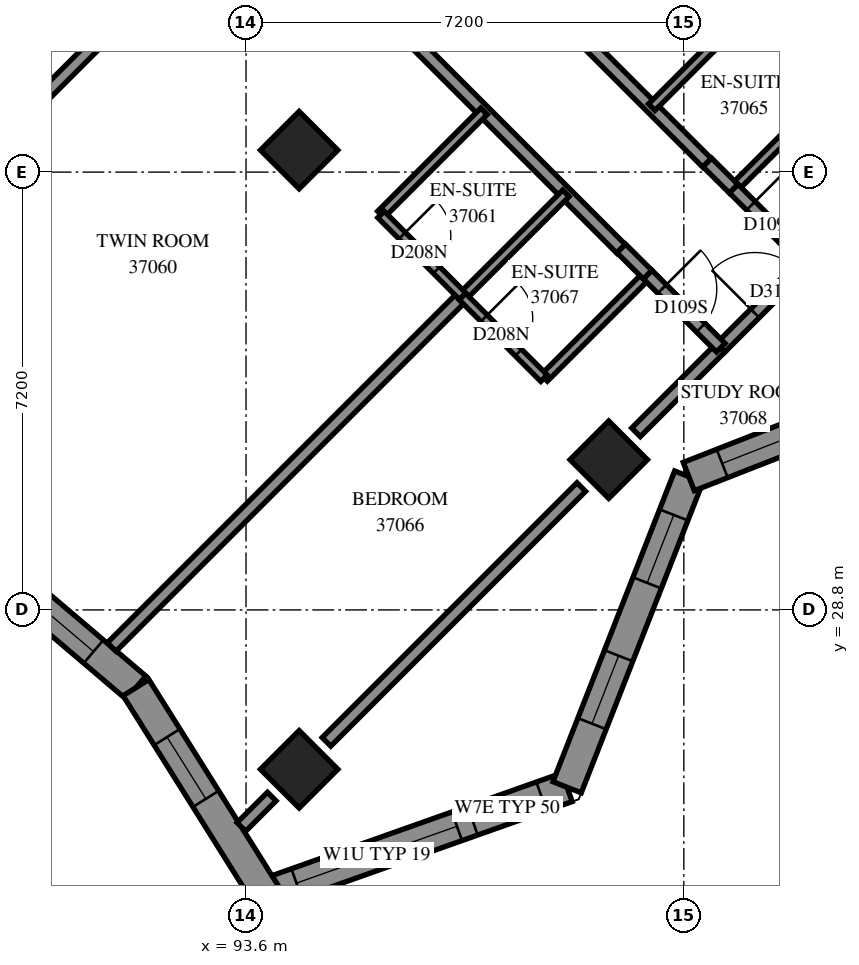
"""IFC4 building model, lengths in metres.
Left out: names, types, materials, properties, quantities, classifications, styles, units other than length and angle.
Written with IfcOpenShell. Run it as: python <this file> out.ifc"""

import sys

from ifc_helpers import new_model, si_unit, direction, frame, frame_2d, origin, origin_2d, place, context, subcontext, project, spatial, polyline, rectangle, outline, extrude, element, fill, save


model = new_model("IFC4")
c1 = context("Model", 3, precision=1e-05, world=origin(), true_north=direction((0.0, 1.0)))
c2 = subcontext(c1, "Body", "Model", "MODEL_VIEW")
j1 = project(units=[si_unit("LENGTHUNIT", "METRE"), si_unit("PLANEANGLEUNIT", "RADIAN")], contexts=[c1])
p1 = place(None, origin())
s1 = spatial("IfcSite", under=j1, at=p1, CompositionType="ELEMENT")
p2 = place(p1, origin())
s2 = spatial("IfcBuilding", under=s1, at=p2, CompositionType="ELEMENT")
p3 = place(p2, frame((0.0, 0.0, 138.8)))
s3 = spatial("IfcBuildingStorey", under=s2, at=p3, CompositionType="ELEMENT", Elevation=138.8)
for number, where, z_axis, x_axis in (
    (1, (94.474, 36.362, 0.0), (0.0, 0.0, 1.0), (0.707, -0.707, 0.0)),
    (2, (99.565, 31.271, 0.0), (0.0, 0.0, 1.0), (0.707, -0.707, 0.0)),
    (3, (94.474, 26.18, 0.0), (0.0, 0.0, 1.0), (0.707, -0.707, 0.0)),
):
    element("IfcColumn", number, at=place(p3, frame(where, z_axis=z_axis, x_axis=x_axis)), inside=s3, PredefinedType="COLUMN", context=c2, shape_type="SweptSolid", body=[
        extrude(rectangle(XDim=0.9, YDim=0.9, at=origin_2d()), origin(), (0.0, 0.0, 1.0), 3.1),
    ])
p4 = place(p3, frame((93.921, 24.127, 0.0), z_axis=(0.0, 0.0, 1.0), x_axis=(0.9426181277, 0.333872828, 0.0)))
e4 = element("IfcWall", 4, at=p4, inside=s3, PredefinedType="SOLIDWALL", context=c2, shape_type="SweptSolid", body=[
    extrude(outline(polyline([(-0.2, -0.25), (5.375, -0.25), (5.147, 0.25), (0.2, 0.25), (-0.2, -0.25)])), origin(), (0.0, 0.0, 1.0), 3.1),
])
p5 = place(p4, frame((0.539, 0.0, 0.45)))
e5 = element("IfcOpeningElement", 5, at=p5, cuts=e4, PredefinedType="OPENING", context=c2, shape_type="SweptSolid", body=[
    extrude(rectangle(XDim=2.8, YDim=2.5, at=frame_2d((1.4, 1.25))), frame((0.0, 0.26, 0.0), z_axis=(0.0, -1.0, 0.0), x_axis=(1.0, 0.0, 0.0)), (0.0, 0.0, 1.0), 0.52),
])
p6 = place(p4, frame((3.613, 0.0, 0.45)))
e6 = element("IfcOpeningElement", 6, at=p6, cuts=e4, PredefinedType="OPENING", context=c2, shape_type="SweptSolid", body=[
    extrude(rectangle(XDim=1.2, YDim=2.5, at=frame_2d((0.6, 1.25))), frame((0.0, 0.26, 0.0), z_axis=(0.0, -1.0, 0.0), x_axis=(1.0, 0.0, 0.0)), (0.0, 0.0, 1.0), 0.52),
])
p7 = place(p3, frame((98.88, 25.884, 0.0), z_axis=(0.0, 0.0, 1.0), x_axis=(0.3646666187, 0.9311381515, 0.0)))
e7 = element("IfcWall", 7, at=p7, inside=s3, PredefinedType="SOLIDWALL", context=c2, shape_type="SweptSolid", body=[
    extrude(outline(polyline([(-0.114, -0.25), (5.378, -0.25), (5.597, 0.25), (0.114, 0.25), (-0.114, -0.25)])), origin(), (0.0, 0.0, 1.0), 3.1),
])
p8 = place(p7, frame((1.123, 0.0, 0.45)))
e8 = element("IfcOpeningElement", 8, at=p8, cuts=e7, PredefinedType="OPENING", context=c2, shape_type="SweptSolid", body=[
    extrude(rectangle(XDim=1.2, YDim=2.5, at=frame_2d((0.6, 1.25))), frame((0.0, 0.26, 0.0), z_axis=(0.0, -1.0, 0.0), x_axis=(1.0, 0.0, 0.0)), (0.0, 0.0, 1.0), 0.52),
])
p9 = place(p7, frame((3.61, 0.0, 0.45)))
e9 = element("IfcOpeningElement", 9, at=p9, cuts=e7, PredefinedType="OPENING", context=c2, shape_type="SweptSolid", body=[
    extrude(rectangle(XDim=1.2, YDim=2.5, at=frame_2d((0.6, 1.25))), frame((0.0, 0.26, 0.0), z_axis=(0.0, -1.0, 0.0), x_axis=(1.0, 0.0, 0.0)), (0.0, 0.0, 1.0), 0.52),
])
p10 = place(p3, frame((100.881, 30.993, 0.0), z_axis=(0.0, 0.0, 1.0), x_axis=(0.9311443392, 0.3646508186, 0.0)))
e10 = element("IfcWall", 10, at=p10, inside=s3, PredefinedType="SOLIDWALL", context=c2, shape_type="SweptSolid", body=[
    extrude(outline(polyline([(0.109, -0.25), (5.602, -0.25), (5.373, 0.25), (-0.109, 0.25), (0.109, -0.25)])), origin(), (0.0, 0.0, 1.0), 3.1),
])
p11 = place(p10, frame((0.589, 0.0, 0.45)))
e11 = element("IfcOpeningElement", 11, at=p11, cuts=e10, PredefinedType="OPENING", context=c2, shape_type="SweptSolid", body=[
    extrude(rectangle(XDim=2.8, YDim=2.5, at=frame_2d((1.4, 1.25))), frame((0.0, 0.26, 0.0), z_axis=(0.0, -1.0, 0.0), x_axis=(1.0, 0.0, 0.0)), (0.0, 0.0, 1.0), 0.52),
])
p12 = place(p3, frame((88.669, 30.175, 0.0), z_axis=(0.0, 0.0, 1.0), x_axis=(0.76200858, -0.6475669262, 0.0)))
e12 = element("IfcWall", 12, at=p12, inside=s3, PredefinedType="SOLIDWALL", context=c2, shape_type="SweptSolid", body=[
    extrude(outline(polyline([(-0.02, -0.25), (4.058, -0.25), (4.135, 0.25), (0.02, 0.25), (-0.02, -0.25)])), origin(), (0.0, 0.0, 1.0), 3.1),
])
p13 = place(p12, frame((0.38, 0.0, 0.45)))
e13 = element("IfcOpeningElement", 13, at=p13, cuts=e12, PredefinedType="OPENING", context=c2, shape_type="SweptSolid", body=[
    extrude(rectangle(XDim=2.8, YDim=2.5, at=frame_2d((1.4, 1.25))), frame((0.0, 0.26, 0.0), z_axis=(0.0, -1.0, 0.0), x_axis=(1.0, 0.0, 0.0)), (0.0, 0.0, 1.0), 0.52),
])
p14 = place(p3, frame((91.791, 27.522, 0.0), z_axis=(0.0, 0.0, 1.0), x_axis=(0.5315858435, -0.847004422, 0.0)))
e14 = element("IfcWall", 14, at=p14, inside=s3, PredefinedType="SOLIDWALL", context=c2, shape_type="SweptSolid", body=[
    extrude(outline(polyline([(0.038, -0.25), (4.208, -0.25), (3.808, 0.25), (-0.038, 0.25), (0.038, -0.25)])), origin(), (0.0, 0.0, 1.0), 3.1),
])
p15 = place(p14, frame((0.96, 0.0, 0.45)))
e15 = element("IfcOpeningElement", 15, at=p15, cuts=e14, PredefinedType="OPENING", context=c2, shape_type="SweptSolid", body=[
    extrude(rectangle(XDim=1.2, YDim=2.5, at=frame_2d((0.6, 1.25))), frame((0.0, 0.26, 0.0), z_axis=(0.0, -1.0, 0.0), x_axis=(1.0, 0.0, 0.0)), (0.0, 0.0, 1.0), 0.52),
])
p16 = place(p3, frame((86.331, 33.312, 0.0), z_axis=(0.0, 0.0, 1.0), x_axis=(0.7071067812, 0.7071067812, 0.0)))
e16 = element("IfcWall", 16, at=p16, inside=s3, PredefinedType="PARTITIONING", context=c2, shape_type="SweptSolid", body=[
    extrude(rectangle(XDim=10.514, YDim=0.2, at=frame_2d((5.257, 0.0))), origin(), (0.0, 0.0, 1.0), 3.1),
])
p17 = place(p3, frame((93.127, 41.379, 0.0), z_axis=(0.0, 0.0, 1.0), x_axis=(0.7071067812, -0.7071067812, 0.0)))
e17 = element("IfcWall", 17, at=p17, inside=s3, PredefinedType="PARTITIONING", context=c2, shape_type="SweptSolid", body=[
    extrude(rectangle(XDim=9.39, YDim=0.2, at=frame_2d((4.695, 0.0))), origin(), (0.0, 0.0, 1.0), 3.1),
])
p18 = place(p17, frame((3.2, 0.0, 0.0)))
e18 = element("IfcOpeningElement", 18, at=p18, cuts=e17, PredefinedType="OPENING", context=c2, shape_type="SweptSolid", body=[
    extrude(rectangle(XDim=0.9, YDim=2.1, at=frame_2d((0.45, 1.05))), frame((0.0, 0.11, 0.0), z_axis=(0.0, -1.0, 0.0), x_axis=(1.0, 0.0, 0.0)), (0.0, 0.0, 1.0), 0.22),
])
p19 = place(p3, frame((86.837, 35.091, 0.0), z_axis=(0.0, 0.0, 1.0), x_axis=(0.7071067812, 0.7071067812, 0.0)))
e19 = element("IfcWall", 19, at=p19, inside=s3, PredefinedType="PARTITIONING", context=c2, shape_type="SweptSolid", body=[
    extrude(rectangle(XDim=8.898, YDim=0.2, at=frame_2d((4.449, 0.0))), origin(), (0.0, 0.0, 1.0), 3.1),
])
p20 = place(p19, frame((7.7, 0.0, 0.0)))
e20 = element("IfcOpeningElement", 20, at=p20, cuts=e19, PredefinedType="OPENING", context=c2, shape_type="SweptSolid", body=[
    extrude(rectangle(XDim=1.0, YDim=2.1, at=frame_2d((0.5, 1.05))), frame((0.0, 0.11, 0.0), z_axis=(0.0, -1.0, 0.0), x_axis=(1.0, 0.0, 0.0)), (0.0, 0.0, 1.0), 0.22),
])
p21 = place(p3, frame((95.177, 42.157, 0.0), z_axis=(0.0, 0.0, 1.0), x_axis=(0.7071067812, -0.7071067812, 0.0)))
e21 = element("IfcWall", 21, at=p21, inside=s3, PredefinedType="PARTITIONING", context=c2, shape_type="SweptSolid", body=[
    extrude(rectangle(XDim=8.491, YDim=0.2, at=frame_2d((4.245, 0.0))), origin(), (0.0, 0.0, 1.0), 3.1),
])
p22 = place(p21, frame((2.3, 0.0, 0.0)))
e22 = element("IfcOpeningElement", 22, at=p22, cuts=e21, PredefinedType="OPENING", context=c2, shape_type="SweptSolid", body=[
    extrude(rectangle(XDim=0.9, YDim=2.1, at=frame_2d((0.45, 1.05))), frame((0.0, 0.11, 0.0), z_axis=(0.0, -1.0, 0.0), x_axis=(1.0, 0.0, 0.0)), (0.0, 0.0, 1.0), 0.22),
])
p23 = place(p21, frame((3.95, 0.0, 0.0)))
e23 = element("IfcOpeningElement", 23, at=p23, cuts=e21, PredefinedType="OPENING", context=c2, shape_type="SweptSolid", body=[
    extrude(rectangle(XDim=0.9, YDim=2.1, at=frame_2d((0.45, 1.05))), frame((0.0, 0.11, 0.0), z_axis=(0.0, -1.0, 0.0), x_axis=(1.0, 0.0, 0.0)), (0.0, 0.0, 1.0), 0.22),
])
p24 = place(p3, frame((91.391, 28.19, 0.0), z_axis=(0.0, 0.0, 1.0), x_axis=(0.7071067812, 0.7071067812, 0.0)))
e24 = element("IfcWall", 24, at=p24, inside=s3, PredefinedType="PARTITIONING", context=c2, shape_type="SweptSolid", body=[
    extrude(rectangle(XDim=8.158, YDim=0.2, at=frame_2d((4.079, 0.0))), origin(), (0.0, 0.0, 1.0), 3.1),
])
p25 = place(p3, frame((94.923, 26.631, 0.0), z_axis=(0.0, 0.0, 1.0), x_axis=(0.7071067812, 0.7071067812, 0.0)))
e25 = element("IfcWall", 25, at=p25, inside=s3, PredefinedType="PARTITIONING", context=c2, shape_type="SweptSolid", body=[
    extrude(rectangle(XDim=5.926, YDim=0.2, at=frame_2d((2.963, 0.0))), origin(), (0.0, 0.0, 1.0), 2.6),
])
p26 = place(p3, frame((98.503, 32.615, 0.0), z_axis=(0.0, 0.0, 1.0), x_axis=(0.7071067812, 0.7071067812, 0.0)))
e26 = element("IfcWall", 26, at=p26, inside=s3, PredefinedType="PARTITIONING", context=c2, shape_type="SweptSolid", body=[
    extrude(rectangle(XDim=2.401, YDim=0.15, at=frame_2d((1.201, 0.0))), origin(), (0.0, 0.0, 1.0), 3.1),
])
for number, where, z_axis, x_axis in (
    (27, (97.163, 33.955, 0.0), (0.0, 0.0, 1.0), (0.708, 0.707, 0.0)),
    (28, (100.273, 37.067, 0.0), (0.0, 0.0, 1.0), (0.707, 0.708, 0.0)),
):
    element("IfcWall", number, at=place(p3, frame(where, z_axis=z_axis, x_axis=x_axis)), inside=s3, PredefinedType="PARTITIONING", context=c2, shape_type="SweptSolid", body=[
        extrude(rectangle(XDim=2.4, YDim=0.15, at=frame_2d((1.2, 0.0))), origin(), (0.0, 0.0, 1.0), 3.1),
    ])
for number, where, z_axis, x_axis in (
    (29, (95.817, 35.303, 0.0), (0.0, 0.0, 1.0), (0.707, 0.707, 0.0)),
    (30, (101.615, 35.727, 0.0), (0.0, 0.0, 1.0), (0.707, 0.707, 0.0)),
):
    element("IfcWall", number, at=place(p3, frame(where, z_axis=z_axis, x_axis=x_axis)), inside=s3, PredefinedType="PARTITIONING", context=c2, shape_type="SweptSolid", body=[
        extrude(rectangle(XDim=2.398, YDim=0.15, at=frame_2d((1.199, 0.0))), origin(), (0.0, 0.0, 1.0), 3.1),
    ])
p27 = place(p3, frame((101.403, 33.111, 0.0), z_axis=(0.0, 0.0, 1.0), x_axis=(0.7071067812, 0.7071067812, 0.0)))
e31 = element("IfcWall", 31, at=p27, inside=s3, PredefinedType="PARTITIONING", context=c2, shape_type="SweptSolid", body=[
    extrude(rectangle(XDim=2.0, YDim=0.2, at=frame_2d((1.0, 0.0))), origin(), (0.0, 0.0, 1.0), 2.6),
])
p28 = place(p27, frame((0.802, 0.0, 0.0)))
e32 = element("IfcOpeningElement", 32, at=p28, cuts=e31, PredefinedType="OPENING", context=c2, shape_type="SweptSolid", body=[
    extrude(rectangle(XDim=1.0, YDim=2.1, at=frame_2d((0.5, 1.05))), frame((0.0, 0.11, 0.0), z_axis=(0.0, -1.0, 0.0), x_axis=(1.0, 0.0, 0.0)), (0.0, 0.0, 1.0), 0.22),
])
p29 = place(p3, frame((100.013, 31.721, 0.0), z_axis=(0.0, 0.0, 1.0), x_axis=(0.7071067812, 0.7071067812, 0.0)))
e33 = element("IfcWall", 33, at=p29, inside=s3, PredefinedType="PARTITIONING", context=c2, shape_type="SweptSolid", body=[
    extrude(rectangle(XDim=1.966, YDim=0.2, at=frame_2d((0.983, 0.0))), origin(), (0.0, 0.0, 1.0), 2.6),
])
p30 = place(p3, frame((97.157, 33.955, 0.0), z_axis=(0.0, 0.0, 1.0), x_axis=(0.7071067812, -0.7071067812, 0.0)))
e34 = element("IfcWall", 34, at=p30, inside=s3, PredefinedType="PARTITIONING", context=c2, shape_type="SweptSolid", body=[
    extrude(rectangle(XDim=1.901, YDim=0.15, at=frame_2d((0.95, 0.0))), origin(), (0.0, 0.0, 1.0), 3.1),
])
p31 = place(p30, frame((0.506, 0.0, 0.0)))
e35 = element("IfcOpeningElement", 35, at=p31, cuts=e34, PredefinedType="OPENING", context=c2, shape_type="SweptSolid", body=[
    extrude(rectangle(XDim=0.8, YDim=2.1, at=frame_2d((0.4, 1.05))), frame((0.0, 0.085, 0.0), z_axis=(0.0, -1.0, 0.0), x_axis=(1.0, 0.0, 0.0)), (0.0, 0.0, 1.0), 0.17),
])
p32 = place(p3, frame((101.965, 38.763, 0.0), z_axis=(0.0, 0.0, 1.0), x_axis=(0.7071067812, -0.7071067812, 0.0)))
e36 = element("IfcWall", 36, at=p32, inside=s3, PredefinedType="PARTITIONING", context=c2, shape_type="SweptSolid", body=[
    extrude(rectangle(XDim=1.901, YDim=0.15, at=frame_2d((0.95, 0.0))), origin(), (0.0, 0.0, 1.0), 3.1),
])
p33 = place(p32, frame((0.608, 0.0, 0.0)))
e37 = element("IfcOpeningElement", 37, at=p33, cuts=e36, PredefinedType="OPENING", context=c2, shape_type="SweptSolid", body=[
    extrude(rectangle(XDim=0.8, YDim=2.1, at=frame_2d((0.4, 1.05))), frame((0.0, 0.085, 0.0), z_axis=(0.0, -1.0, 0.0), x_axis=(1.0, 0.0, 0.0)), (0.0, 0.0, 1.0), 0.17),
])
p34 = place(p3, frame((95.82, 35.304, 0.0), z_axis=(0.0, 0.0, 1.0), x_axis=(0.7065800724, -0.7076330979, 0.0)))
e38 = element("IfcWall", 38, at=p34, inside=s3, PredefinedType="PARTITIONING", context=c2, shape_type="SweptSolid", body=[
    extrude(rectangle(XDim=1.899, YDim=0.15, at=frame_2d((0.95, 0.0))), origin(), (0.0, 0.0, 1.0), 3.1),
])
p35 = place(p34, frame((0.493, 0.0, 0.0)))
e39 = element("IfcOpeningElement", 39, at=p35, cuts=e38, PredefinedType="OPENING", context=c2, shape_type="SweptSolid", body=[
    extrude(rectangle(XDim=0.8, YDim=2.1, at=frame_2d((0.4, 1.05))), frame((0.0, 0.085, 0.0), z_axis=(0.0, -1.0, 0.0), x_axis=(1.0, 0.0, 0.0)), (0.0, 0.0, 1.0), 0.17),
])
p36 = place(p3, frame((100.205, 34.315, 0.0), z_axis=(0.0, 0.0, 1.0), x_axis=(0.7071067812, -0.7071067812, 0.0)))
e40 = element("IfcWall", 40, at=p36, inside=s3, PredefinedType="PARTITIONING", context=c2, shape_type="SweptSolid", body=[
    extrude(rectangle(XDim=1.7, YDim=0.2, at=frame_2d((0.85, 0.0))), origin(), (0.0, 0.0, 1.0), 3.1),
])
p37 = place(p36, frame((0.335, 0.0, 0.0)))
e41 = element("IfcOpeningElement", 41, at=p37, cuts=e40, PredefinedType="OPENING", context=c2, shape_type="SweptSolid", body=[
    extrude(rectangle(XDim=0.9, YDim=2.1, at=frame_2d((0.45, 1.05))), frame((0.0, 0.11, 0.0), z_axis=(0.0, -1.0, 0.0), x_axis=(1.0, 0.0, 0.0)), (0.0, 0.0, 1.0), 0.22),
])
p38 = place(p3, frame((101.619, 35.729, 0.0), z_axis=(0.0, 0.0, 1.0), x_axis=(0.7071067812, -0.7071067812, 0.0)))
e42 = element("IfcWall", 42, at=p38, inside=s3, PredefinedType="PARTITIONING", context=c2, shape_type="SweptSolid", body=[
    extrude(rectangle(XDim=1.7, YDim=0.2, at=frame_2d((0.85, 0.0))), origin(), (0.0, 0.0, 1.0), 3.1),
])
p39 = place(p38, frame((0.4, 0.0, 0.0)))
e43 = element("IfcOpeningElement", 43, at=p39, cuts=e42, PredefinedType="OPENING", context=c2, shape_type="SweptSolid", body=[
    extrude(rectangle(XDim=0.9, YDim=2.1, at=frame_2d((0.45, 1.05))), frame((0.0, 0.11, 0.0), z_axis=(0.0, -1.0, 0.0), x_axis=(1.0, 0.0, 0.0)), (0.0, 0.0, 1.0), 0.22),
])
p40 = place(p3, frame((93.523, 25.231, 0.0), z_axis=(0.0, 0.0, 1.0), x_axis=(0.7071775379, 0.7070360174, 0.0)))
e44 = element("IfcWall", 44, at=p40, inside=s3, PredefinedType="PARTITIONING", context=c2, shape_type="SweptSolid", body=[
    extrude(rectangle(XDim=0.707, YDim=0.2, at=frame_2d((0.353, 0.0))), origin(), (0.0, 0.0, 1.0), 3.1),
])
for number, where, z_axis, x_axis in (
    (45, (101.186, 36.158, 0.0), (0.0, 0.0, 1.0), (0.709, -0.705, 0.0)),
    (46, (99.772, 34.744, 0.0), (0.0, 0.0, 1.0), (0.709, -0.705, 0.0)),
):
    element("IfcWall", number, at=place(p3, frame(where, z_axis=z_axis, x_axis=x_axis)), inside=s3, PredefinedType="PARTITIONING", context=c2, shape_type="SweptSolid", body=[
        extrude(rectangle(XDim=0.61, YDim=0.2, at=frame_2d((0.305, 0.0))), origin(), (0.0, 0.0, 1.0), 3.1),
    ])
p41 = place(p5, origin())
e47 = element("IfcWindow", 47, at=p41, inside=s3, PartitioningType="SINGLE_PANEL", PredefinedType="WINDOW", context=c2, shape_type="SweptSolid", body=[
    extrude(rectangle(XDim=2.8, YDim=2.5, at=frame_2d((1.4, 1.25))), frame((0.0, 0.18, 0.0), z_axis=(0.0, -1.0, 0.0), x_axis=(1.0, 0.0, 0.0)), (0.0, 0.0, 1.0), 0.06),
])
fill(e5, e47)
p42 = place(p6, origin())
e48 = element("IfcWindow", 48, at=p42, inside=s3, PartitioningType="SINGLE_PANEL", PredefinedType="WINDOW", context=c2, shape_type="SweptSolid", body=[
    extrude(rectangle(XDim=1.2, YDim=2.5, at=frame_2d((0.6, 1.25))), frame((0.0, 0.18, 0.0), z_axis=(0.0, -1.0, 0.0), x_axis=(1.0, 0.0, 0.0)), (0.0, 0.0, 1.0), 0.06),
])
fill(e6, e48)
p43 = place(p8, origin())
e49 = element("IfcWindow", 49, at=p43, inside=s3, PartitioningType="SINGLE_PANEL", PredefinedType="WINDOW", context=c2, shape_type="SweptSolid", body=[
    extrude(rectangle(XDim=1.2, YDim=2.5, at=frame_2d((0.6, 1.25))), frame((0.0, 0.18, 0.0), z_axis=(0.0, -1.0, 0.0), x_axis=(1.0, 0.0, 0.0)), (0.0, 0.0, 1.0), 0.06),
])
fill(e8, e49)
p44 = place(p9, origin())
e50 = element("IfcWindow", 50, at=p44, inside=s3, PartitioningType="SINGLE_PANEL", PredefinedType="WINDOW", context=c2, shape_type="SweptSolid", body=[
    extrude(rectangle(XDim=1.2, YDim=2.5, at=frame_2d((0.6, 1.25))), frame((0.0, 0.18, 0.0), z_axis=(0.0, -1.0, 0.0), x_axis=(1.0, 0.0, 0.0)), (0.0, 0.0, 1.0), 0.06),
])
fill(e9, e50)
p45 = place(p11, origin())
e51 = element("IfcWindow", 51, at=p45, inside=s3, PartitioningType="SINGLE_PANEL", PredefinedType="WINDOW", context=c2, shape_type="SweptSolid", body=[
    extrude(rectangle(XDim=2.8, YDim=2.5, at=frame_2d((1.4, 1.25))), frame((0.0, 0.18, 0.0), z_axis=(0.0, -1.0, 0.0), x_axis=(1.0, 0.0, 0.0)), (0.0, 0.0, 1.0), 0.06),
])
fill(e11, e51)
p46 = place(p13, origin())
e52 = element("IfcWindow", 52, at=p46, inside=s3, PartitioningType="SINGLE_PANEL", PredefinedType="WINDOW", context=c2, shape_type="SweptSolid", body=[
    extrude(rectangle(XDim=2.8, YDim=2.5, at=frame_2d((1.4, 1.25))), frame((0.0, 0.18, 0.0), z_axis=(0.0, -1.0, 0.0), x_axis=(1.0, 0.0, 0.0)), (0.0, 0.0, 1.0), 0.06),
])
fill(e13, e52)
p47 = place(p15, origin())
e53 = element("IfcWindow", 53, at=p47, inside=s3, PartitioningType="SINGLE_PANEL", PredefinedType="WINDOW", context=c2, shape_type="SweptSolid", body=[
    extrude(rectangle(XDim=1.2, YDim=2.5, at=frame_2d((0.6, 1.25))), frame((0.0, 0.18, 0.0), z_axis=(0.0, -1.0, 0.0), x_axis=(1.0, 0.0, 0.0)), (0.0, 0.0, 1.0), 0.06),
])
fill(e15, e53)
p48 = place(p35, origin())
e54 = element("IfcDoor", 54, at=p48, inside=s3, OperationType="SINGLE_SWING_RIGHT", PredefinedType="DOOR", context=c2, shape_type="SweptSolid", body=[
    extrude(rectangle(XDim=0.8, YDim=2.1, at=frame_2d((0.4, 1.05))), frame((0.0, 0.025, 0.0), z_axis=(0.0, -1.0, 0.0), x_axis=(1.0, 0.0, 0.0)), (0.0, 0.0, 1.0), 0.05),
])
fill(e39, e54)
p49 = place(p39, origin())
e55 = element("IfcDoor", 55, at=p49, inside=s3, OperationType="SINGLE_SWING_RIGHT", PredefinedType="DOOR", context=c2, shape_type="SweptSolid", body=[
    extrude(rectangle(XDim=0.9, YDim=2.1, at=frame_2d((0.45, 1.05))), frame((0.0, 0.025, 0.0), z_axis=(0.0, -1.0, 0.0), x_axis=(1.0, 0.0, 0.0)), (0.0, 0.0, 1.0), 0.05),
])
fill(e43, e55)
p50 = place(p37, origin())
e56 = element("IfcDoor", 56, at=p50, inside=s3, OperationType="SINGLE_SWING_LEFT", PredefinedType="DOOR", context=c2, shape_type="SweptSolid", body=[
    extrude(rectangle(XDim=0.9, YDim=2.1, at=frame_2d((0.45, 1.05))), frame((0.0, 0.025, 0.0), z_axis=(0.0, -1.0, 0.0), x_axis=(1.0, 0.0, 0.0)), (0.0, 0.0, 1.0), 0.05),
])
fill(e41, e56)
p51 = place(p31, origin())
e57 = element("IfcDoor", 57, at=p51, inside=s3, OperationType="SINGLE_SWING_RIGHT", PredefinedType="DOOR", context=c2, shape_type="SweptSolid", body=[
    extrude(rectangle(XDim=0.8, YDim=2.1, at=frame_2d((0.4, 1.05))), frame((0.0, 0.025, 0.0), z_axis=(0.0, -1.0, 0.0), x_axis=(1.0, 0.0, 0.0)), (0.0, 0.0, 1.0), 0.05),
])
fill(e35, e57)
p52 = place(p28, origin())
e58 = element("IfcDoor", 58, at=p52, inside=s3, OperationType="SINGLE_SWING_RIGHT", PredefinedType="DOOR", context=c2, shape_type="SweptSolid", body=[
    extrude(rectangle(XDim=1.0, YDim=2.1, at=frame_2d((0.5, 1.05))), frame((0.0, 0.025, 0.0), z_axis=(0.0, -1.0, 0.0), x_axis=(1.0, 0.0, 0.0)), (0.0, 0.0, 1.0), 0.05),
])
fill(e32, e58)
save(model, sys.argv[1])
